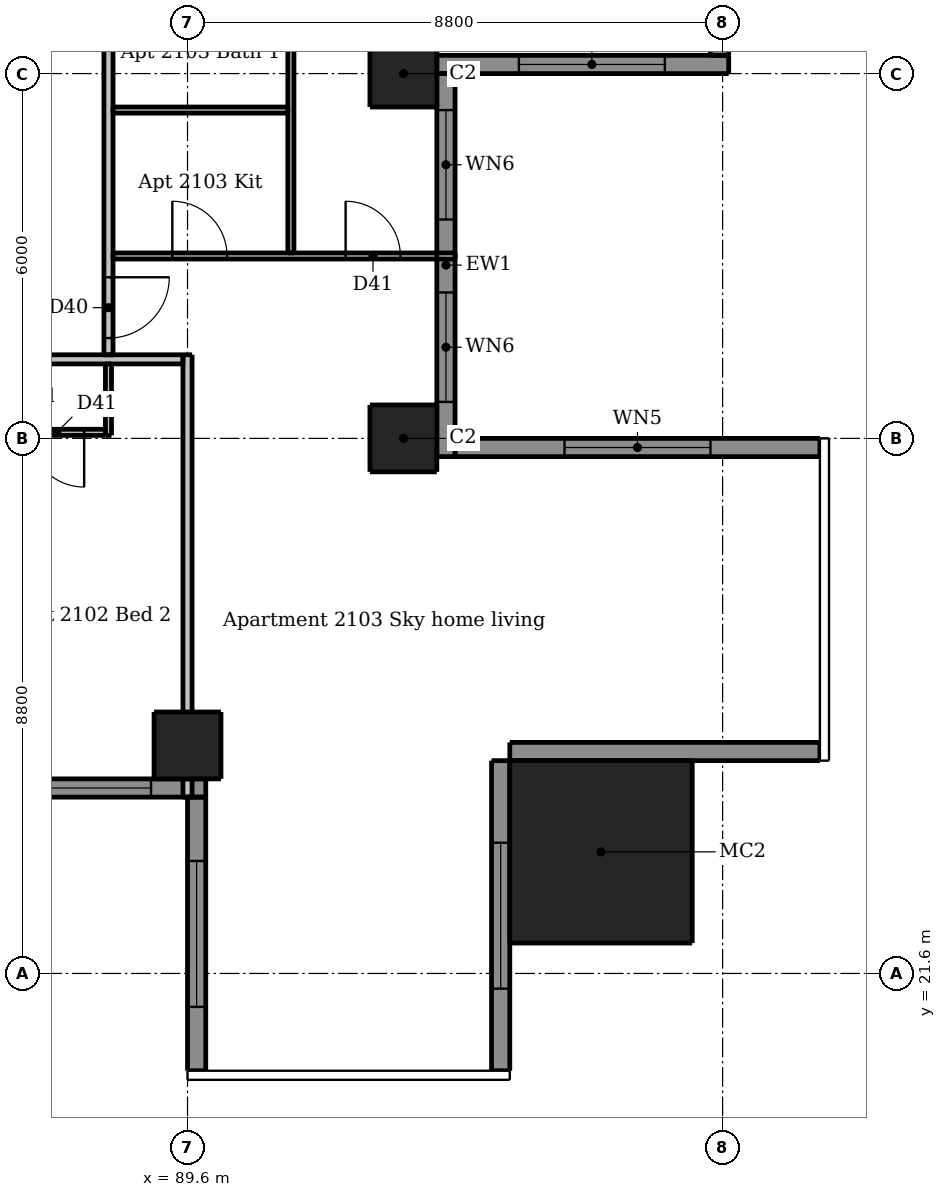
"""IFC4 building model, lengths in metres.
Left out: names, types, materials, properties, quantities, classifications, styles, units other than length and angle.
Written with IfcOpenShell. Run it as: python <this file> out.ifc"""

import sys

from ifc_helpers import new_model, si_unit, direction, frame, frame_2d, origin, origin_2d, place, context, subcontext, project, spatial, rectangle, extrude, element, fill, save


model = new_model("IFC4")
c1 = context("Model", 3, precision=1e-05, world=origin(), true_north=direction((0.0, 1.0)))
c2 = subcontext(c1, "Body", "Model", "MODEL_VIEW")
j1 = project(units=[si_unit("LENGTHUNIT", "METRE"), si_unit("PLANEANGLEUNIT", "RADIAN")], contexts=[c1])
p1 = place(None, origin())
s1 = spatial("IfcSite", under=j1, at=p1, CompositionType="ELEMENT")
p2 = place(p1, origin())
s2 = spatial("IfcBuilding", under=s1, at=p2, CompositionType="ELEMENT")
p3 = place(p2, frame((0.0, 0.0, 82.0)))
s3 = spatial("IfcBuildingStorey", under=s2, at=p3, CompositionType="ELEMENT", Elevation=82.0)
for number, where, z_axis, x_axis in (
    (1, (89.6, 25.35, 0.0), (0.0, 0.0, 1.0), (1.0, 0.0, 0.0)),
    (2, (93.15, 30.4, 0.0), (0.0, 0.0, 1.0), (1.0, 0.0, 0.0)),
    (3, (93.15, 36.4, 0.0), (0.0, 0.0, 1.0), (1.0, 0.0, 0.0)),
):
    element("IfcColumn", number, at=place(p3, frame(where, z_axis=z_axis, x_axis=x_axis)), inside=s3, PredefinedType="COLUMN", context=c2, shape_type="SweptSolid", body=[
        extrude(rectangle(XDim=1.1, YDim=1.1, at=origin_2d()), origin(), (0.0, 0.0, 1.0), 3.05),
    ])
p4 = place(p3, frame((96.4, 23.6, 0.0), z_axis=(0.0, 0.0, 1.0), x_axis=(1.0, 0.0, 0.0)))
e4 = element("IfcColumn", 4, at=p4, inside=s3, PredefinedType="COLUMN", context=c2, shape_type="SweptSolid", body=[
    extrude(rectangle(XDim=3.0, YDim=3.0, at=origin_2d()), origin(), (0.0, 0.0, 1.0), 3.3),
])
p5 = place(p3, frame((89.75, 24.5, 0.0), z_axis=(0.0, 0.0, 1.0), x_axis=(0.0, -1.0, 0.0)))
e5 = element("IfcWall", 5, at=p5, inside=s3, PredefinedType="SOLIDWALL", context=c2, shape_type="SweptSolid", body=[
    extrude(rectangle(XDim=4.5, YDim=0.3, at=frame_2d((2.25, 0.0))), origin(), (0.0, 0.0, 1.0), 3.05),
])
p6 = place(p5, frame((1.05, 0.0, 0.15)))
e6 = element("IfcOpeningElement", 6, at=p6, cuts=e5, PredefinedType="OPENING", context=c2, shape_type="SweptSolid", body=[
    extrude(rectangle(XDim=2.4, YDim=2.1, at=frame_2d((1.2, 1.05))), frame((0.0, 0.16, 0.0), z_axis=(0.0, -1.0, 0.0), x_axis=(1.0, 0.0, 0.0)), (0.0, 0.0, 1.0), 0.32),
])
p7 = place(p3, frame((94.75, 20.0, 0.0), z_axis=(0.0, 0.0, 1.0), x_axis=(0.0, 1.0, 0.0)))
e7 = element("IfcWall", 7, at=p7, inside=s3, PredefinedType="SOLIDWALL", context=c2, shape_type="SweptSolid", body=[
    extrude(rectangle(XDim=5.1, YDim=0.3, at=frame_2d((2.55, 0.0))), origin(), (0.0, 0.0, 1.0), 3.05),
])
p8 = place(p7, frame((1.35, 0.0, 0.15)))
e8 = element("IfcOpeningElement", 8, at=p8, cuts=e7, PredefinedType="OPENING", context=c2, shape_type="SweptSolid", body=[
    extrude(rectangle(XDim=2.4, YDim=2.1, at=frame_2d((1.2, 1.05))), frame((0.0, 0.16, 0.0), z_axis=(0.0, -1.0, 0.0), x_axis=(1.0, 0.0, 0.0)), (0.0, 0.0, 1.0), 0.32),
])
p9 = place(p3, frame((94.9, 25.25, 0.0), z_axis=(0.0, 0.0, 1.0), x_axis=(1.0, 0.0, 0.0)))
e9 = element("IfcWall", 9, at=p9, inside=s3, PredefinedType="SOLIDWALL", context=c2, shape_type="SweptSolid", body=[
    extrude(rectangle(XDim=5.1, YDim=0.3, at=frame_2d((2.55, 0.0))), origin(), (0.0, 0.0, 1.0), 3.05),
])
p10 = place(p3, frame((100.0, 30.25, 0.0), z_axis=(0.0, 0.0, 1.0), x_axis=(-1.0, 0.0, 0.0)))
e10 = element("IfcWall", 10, at=p10, inside=s3, PredefinedType="SOLIDWALL", context=c2, shape_type="SweptSolid", body=[
    extrude(rectangle(XDim=6.0, YDim=0.3, at=frame_2d((3.0, 0.0))), origin(), (0.0, 0.0, 1.0), 3.05),
])
p11 = place(p10, frame((1.8, 0.0, 0.15)))
e11 = element("IfcOpeningElement", 11, at=p11, cuts=e10, PredefinedType="OPENING", context=c2, shape_type="SweptSolid", body=[
    extrude(rectangle(XDim=2.4, YDim=2.1, at=frame_2d((1.2, 1.05))), frame((0.0, 0.16, 0.0), z_axis=(0.0, -1.0, 0.0), x_axis=(1.0, 0.0, 0.0)), (0.0, 0.0, 1.0), 0.32),
])
p12 = place(p3, frame((93.7, 36.55, 0.0), z_axis=(0.0, 0.0, 1.0), x_axis=(1.0, 0.0, 0.0)))
e12 = element("IfcWall", 12, at=p12, inside=s3, PredefinedType="SOLIDWALL", context=c2, shape_type="SweptSolid", body=[
    extrude(rectangle(XDim=4.8, YDim=0.3, at=frame_2d((2.4, 0.0))), origin(), (0.0, 0.0, 1.0), 3.05),
])
p13 = place(p12, frame((1.35, 0.0, 0.15)))
e13 = element("IfcOpeningElement", 13, at=p13, cuts=e12, PredefinedType="OPENING", context=c2, shape_type="SweptSolid", body=[
    extrude(rectangle(XDim=2.4, YDim=2.1, at=frame_2d((1.2, 1.05))), frame((0.0, 0.16, 0.0), z_axis=(0.0, -1.0, 0.0), x_axis=(1.0, 0.0, 0.0)), (0.0, 0.0, 1.0), 0.32),
])
p14 = place(p3, frame((83.6, 24.65, 0.0), z_axis=(0.0, 0.0, 1.0), x_axis=(1.0, 0.0, 0.0)))
e14 = element("IfcWall", 14, at=p14, inside=s3, PredefinedType="SOLIDWALL", context=c2, shape_type="SweptSolid", body=[
    extrude(rectangle(XDim=6.3, YDim=0.3, at=frame_2d((3.15, 0.0))), origin(), (0.0, 0.0, 1.0), 3.05),
])
p15 = place(p14, frame((0.6, 0.0, 0.15)))
e15 = element("IfcOpeningElement", 15, at=p15, cuts=e14, PredefinedType="OPENING", context=c2, shape_type="SweptSolid", body=[
    extrude(rectangle(XDim=1.8, YDim=2.1, at=frame_2d((0.9, 1.05))), frame((0.0, 0.16, 0.0), z_axis=(0.0, -1.0, 0.0), x_axis=(1.0, 0.0, 0.0)), (0.0, 0.0, 1.0), 0.32),
])
p16 = place(p14, frame((3.6, 0.0, 0.15)))
e16 = element("IfcOpeningElement", 16, at=p16, cuts=e14, PredefinedType="OPENING", context=c2, shape_type="SweptSolid", body=[
    extrude(rectangle(XDim=1.8, YDim=2.1, at=frame_2d((0.9, 1.05))), frame((0.0, 0.16, 0.0), z_axis=(0.0, -1.0, 0.0), x_axis=(1.0, 0.0, 0.0)), (0.0, 0.0, 1.0), 0.32),
])
p17 = place(p3, frame((93.85, 30.1, 0.0), z_axis=(0.0, 0.0, 1.0), x_axis=(0.0, 1.0, 0.0)))
e17 = element("IfcWall", 17, at=p17, inside=s3, PredefinedType="SOLIDWALL", context=c2, shape_type="SweptSolid", body=[
    extrude(rectangle(XDim=6.3, YDim=0.3, at=frame_2d((3.15, 0.0))), origin(), (0.0, 0.0, 1.0), 3.05),
])
p18 = place(p17, frame((0.9, 0.0, 0.15)))
e18 = element("IfcOpeningElement", 18, at=p18, cuts=e17, PredefinedType="OPENING", context=c2, shape_type="SweptSolid", body=[
    extrude(rectangle(XDim=1.8, YDim=2.1, at=frame_2d((0.9, 1.05))), frame((0.0, 0.16, 0.0), z_axis=(0.0, -1.0, 0.0), x_axis=(1.0, 0.0, 0.0)), (0.0, 0.0, 1.0), 0.32),
])
p19 = place(p17, frame((3.9, 0.0, 0.15)))
e19 = element("IfcOpeningElement", 19, at=p19, cuts=e17, PredefinedType="OPENING", context=c2, shape_type="SweptSolid", body=[
    extrude(rectangle(XDim=1.8, YDim=2.1, at=frame_2d((0.9, 1.05))), frame((0.0, 0.16, 0.0), z_axis=(0.0, -1.0, 0.0), x_axis=(1.0, 0.0, 0.0)), (0.0, 0.0, 1.0), 0.32),
])
p20 = place(p3, frame((98.35, 36.7, 0.0), z_axis=(0.0, 0.0, 1.0), x_axis=(0.0, 1.0, 0.0)))
e20 = element("IfcWall", 20, at=p20, inside=s3, PredefinedType="SOLIDWALL", context=c2, shape_type="SweptSolid", body=[
    extrude(rectangle(XDim=5.7, YDim=0.3, at=frame_2d((2.85, 0.0))), origin(), (0.0, 0.0, 1.0), 3.05),
])
p21 = place(p20, frame((0.3, 0.0, 0.15)))
e21 = element("IfcOpeningElement", 21, at=p21, cuts=e20, PredefinedType="OPENING", context=c2, shape_type="SweptSolid", body=[
    extrude(rectangle(XDim=1.8, YDim=2.1, at=frame_2d((0.9, 1.05))), frame((0.0, 0.16, 0.0), z_axis=(0.0, -1.0, 0.0), x_axis=(1.0, 0.0, 0.0)), (0.0, 0.0, 1.0), 0.32),
])
p22 = place(p20, frame((3.3, 0.0, 0.15)))
e22 = element("IfcOpeningElement", 22, at=p22, cuts=e20, PredefinedType="OPENING", context=c2, shape_type="SweptSolid", body=[
    extrude(rectangle(XDim=1.8, YDim=2.1, at=frame_2d((0.9, 1.05))), frame((0.0, 0.16, 0.0), z_axis=(0.0, -1.0, 0.0), x_axis=(1.0, 0.0, 0.0)), (0.0, 0.0, 1.0), 0.32),
])
p23 = place(p3, frame((88.3, 30.45, 0.0), z_axis=(0.0, 0.0, 1.0), x_axis=(0.0, 1.0, 0.0)))
e23 = element("IfcWall", 23, at=p23, inside=s3, PredefinedType="PARTITIONING", context=c2, shape_type="SweptSolid", body=[
    extrude(rectangle(XDim=1.175, YDim=0.1, at=frame_2d((0.587, 0.0))), origin(), (0.0, 0.0, 1.0), 3.05),
])
p24 = place(p3, frame((91.3, 33.45, 0.0), z_axis=(0.0, 0.0, 1.0), x_axis=(0.0, 1.0, 0.0)))
e24 = element("IfcWall", 24, at=p24, inside=s3, PredefinedType="PARTITIONING", context=c2, shape_type="SweptSolid", body=[
    extrude(rectangle(XDim=5.975, YDim=0.1, at=frame_2d((2.988, 0.0))), origin(), (0.0, 0.0, 1.0), 3.05),
])
p25 = place(p24, frame((3.8, 0.0, 0.0)))
e25 = element("IfcOpeningElement", 25, at=p25, cuts=e24, PredefinedType="OPENING", context=c2, shape_type="SweptSolid", body=[
    extrude(rectangle(XDim=0.8, YDim=2.1, at=frame_2d((0.4, 1.05))), frame((0.0, 0.06, 0.0), z_axis=(0.0, -1.0, 0.0), x_axis=(1.0, 0.0, 0.0)), (0.0, 0.0, 1.0), 0.12),
])
p26 = place(p3, frame((88.375, 35.8, 0.0), z_axis=(0.0, 0.0, 1.0), x_axis=(1.0, 0.0, 0.0)))
e26 = element("IfcWall", 26, at=p26, inside=s3, PredefinedType="PARTITIONING", context=c2, shape_type="SweptSolid", body=[
    extrude(rectangle(XDim=2.875, YDim=0.1, at=frame_2d((1.438, 0.0))), origin(), (0.0, 0.0, 1.0), 3.05),
])
p27 = place(p3, frame((88.375, 33.4, 0.0), z_axis=(0.0, 0.0, 1.0), x_axis=(1.0, 0.0, 0.0)))
e27 = element("IfcWall", 27, at=p27, inside=s3, PredefinedType="PARTITIONING", context=c2, shape_type="SweptSolid", body=[
    extrude(rectangle(XDim=5.625, YDim=0.1, at=frame_2d((2.812, 0.0))), origin(), (0.0, 0.0, 1.0), 3.05),
])
p28 = place(p27, frame((0.975, 0.0, 0.0)))
e28 = element("IfcOpeningElement", 28, at=p28, cuts=e27, PredefinedType="OPENING", context=c2, shape_type="SweptSolid", body=[
    extrude(rectangle(XDim=0.9, YDim=2.1, at=frame_2d((0.45, 1.05))), frame((0.0, 0.06, 0.0), z_axis=(0.0, -1.0, 0.0), x_axis=(1.0, 0.0, 0.0)), (0.0, 0.0, 1.0), 0.12),
])
p29 = place(p27, frame((3.825, 0.0, 0.0)))
e29 = element("IfcOpeningElement", 29, at=p29, cuts=e27, PredefinedType="OPENING", context=c2, shape_type="SweptSolid", body=[
    extrude(rectangle(XDim=0.9, YDim=2.1, at=frame_2d((0.45, 1.05))), frame((0.0, 0.06, 0.0), z_axis=(0.0, -1.0, 0.0), x_axis=(1.0, 0.0, 0.0)), (0.0, 0.0, 1.0), 0.12),
])
p30 = place(p3, frame((88.25, 30.5, 0.0), z_axis=(0.0, 0.0, 1.0), x_axis=(-1.0, 0.0, 0.0)))
e30 = element("IfcWall", 30, at=p30, inside=s3, PredefinedType="PARTITIONING", context=c2, shape_type="SweptSolid", body=[
    extrude(rectangle(XDim=13.475, YDim=0.1, at=frame_2d((6.738, 0.0))), origin(), (0.0, 0.0, 1.0), 3.05),
])
p31 = place(p30, frame((6.3, 0.0, 0.0)))
e31 = element("IfcOpeningElement", 31, at=p31, cuts=e30, PredefinedType="OPENING", context=c2, shape_type="SweptSolid", body=[
    extrude(rectangle(XDim=0.9, YDim=2.1, at=frame_2d((0.45, 1.05))), frame((0.0, 0.06, 0.0), z_axis=(0.0, -1.0, 0.0), x_axis=(1.0, 0.0, 0.0)), (0.0, 0.0, 1.0), 0.12),
])
p32 = place(p30, frame((2.4, 0.0, 0.0)))
e32 = element("IfcOpeningElement", 32, at=p32, cuts=e30, PredefinedType="OPENING", context=c2, shape_type="SweptSolid", body=[
    extrude(rectangle(XDim=0.9, YDim=2.1, at=frame_2d((0.45, 1.05))), frame((0.0, 0.06, 0.0), z_axis=(0.0, -1.0, 0.0), x_axis=(1.0, 0.0, 0.0)), (0.0, 0.0, 1.0), 0.12),
])
p33 = place(p30, frame((4.5, 0.0, 0.0)))
e33 = element("IfcOpeningElement", 33, at=p33, cuts=e30, PredefinedType="OPENING", context=c2, shape_type="SweptSolid", body=[
    extrude(rectangle(XDim=0.9, YDim=2.1, at=frame_2d((0.45, 1.05))), frame((0.0, 0.06, 0.0), z_axis=(0.0, -1.0, 0.0), x_axis=(1.0, 0.0, 0.0)), (0.0, 0.0, 1.0), 0.12),
])
p34 = place(p30, frame((11.35, 0.0, 0.0)))
e34 = element("IfcOpeningElement", 34, at=p34, cuts=e30, PredefinedType="OPENING", context=c2, shape_type="SweptSolid", body=[
    extrude(rectangle(XDim=0.9, YDim=2.1, at=frame_2d((0.45, 1.05))), frame((0.0, 0.06, 0.0), z_axis=(0.0, -1.0, 0.0), x_axis=(1.0, 0.0, 0.0)), (0.0, 0.0, 1.0), 0.12),
])
p35 = place(p30, frame((0.35, 0.0, 0.0)))
e35 = element("IfcOpeningElement", 35, at=p35, cuts=e30, PredefinedType="OPENING", context=c2, shape_type="SweptSolid", body=[
    extrude(rectangle(XDim=0.9, YDim=2.1, at=frame_2d((0.45, 1.05))), frame((0.0, 0.06, 0.0), z_axis=(0.0, -1.0, 0.0), x_axis=(1.0, 0.0, 0.0)), (0.0, 0.0, 1.0), 0.12),
])
p36 = place(p30, frame((8.45, 0.0, 0.0)))
e36 = element("IfcOpeningElement", 36, at=p36, cuts=e30, PredefinedType="OPENING", context=c2, shape_type="SweptSolid", body=[
    extrude(rectangle(XDim=0.8, YDim=2.1, at=frame_2d((0.4, 1.05))), frame((0.0, 0.06, 0.0), z_axis=(0.0, -1.0, 0.0), x_axis=(1.0, 0.0, 0.0)), (0.0, 0.0, 1.0), 0.12),
])
p37 = place(p3, frame((88.3, 60.475, 0.0), z_axis=(0.0, 0.0, 1.0), x_axis=(0.0, -1.0, 0.0)))
e37 = element("IfcWall", 37, at=p37, inside=s3, PredefinedType="PARTITIONING", context=c2, shape_type="SweptSolid", body=[
    extrude(rectangle(XDim=28.7, YDim=0.15, at=frame_2d((14.35, 0.0))), origin(), (0.0, 0.0, 1.0), 3.05),
])
p38 = place(p37, frame((27.425, 0.0, 0.0)))
e38 = element("IfcOpeningElement", 38, at=p38, cuts=e37, PredefinedType="OPENING", context=c2, shape_type="SweptSolid", body=[
    extrude(rectangle(XDim=1.0, YDim=2.1, at=frame_2d((0.5, 1.05))), frame((0.0, 0.085, 0.0), z_axis=(0.0, -1.0, 0.0), x_axis=(1.0, 0.0, 0.0)), (0.0, 0.0, 1.0), 0.17),
])
p39 = place(p37, frame((10.575, 0.0, 0.0)))
e39 = element("IfcOpeningElement", 39, at=p39, cuts=e37, PredefinedType="OPENING", context=c2, shape_type="SweptSolid", body=[
    extrude(rectangle(XDim=1.0, YDim=2.1, at=frame_2d((0.5, 1.05))), frame((0.0, 0.085, 0.0), z_axis=(0.0, -1.0, 0.0), x_axis=(1.0, 0.0, 0.0)), (0.0, 0.0, 1.0), 0.17),
])
p40 = place(p3, frame((89.6, 24.5, 0.0), z_axis=(0.0, 0.0, 1.0), x_axis=(0.0, 1.0, 0.0)))
e40 = element("IfcWall", 40, at=p40, inside=s3, PredefinedType="PARTITIONING", context=c2, shape_type="SweptSolid", body=[
    extrude(rectangle(XDim=7.275, YDim=0.15, at=frame_2d((3.637, 0.0))), origin(), (0.0, 0.0, 1.0), 2.516),
])
p41 = place(p3, frame((89.525, 31.7, 0.0), z_axis=(0.0, 0.0, 1.0), x_axis=(-1.0, 0.0, 0.0)))
e41 = element("IfcWall", 41, at=p41, inside=s3, PredefinedType="PARTITIONING", context=c2, shape_type="SweptSolid", body=[
    extrude(rectangle(XDim=28.75, YDim=0.15, at=frame_2d((14.375, 0.0))), origin(), (0.0, 0.0, 1.0), 3.05),
])
p42 = place(p41, frame((24.625, 0.0, 0.0)))
e42 = element("IfcOpeningElement", 42, at=p42, cuts=e41, PredefinedType="OPENING", context=c2, shape_type="SweptSolid", body=[
    extrude(rectangle(XDim=1.0, YDim=2.1, at=frame_2d((0.5, 1.05))), frame((0.0, 0.085, 0.0), z_axis=(0.0, -1.0, 0.0), x_axis=(1.0, 0.0, 0.0)), (0.0, 0.0, 1.0), 0.17),
])
p43 = place(p41, frame((7.525, 0.0, 0.0)))
e43 = element("IfcOpeningElement", 43, at=p43, cuts=e41, PredefinedType="OPENING", context=c2, shape_type="SweptSolid", body=[
    extrude(rectangle(XDim=1.0, YDim=2.1, at=frame_2d((0.5, 1.05))), frame((0.0, 0.085, 0.0), z_axis=(0.0, -1.0, 0.0), x_axis=(1.0, 0.0, 0.0)), (0.0, 0.0, 1.0), 0.17),
])
p44 = place(p6, origin())
e44 = element("IfcWindow", 44, at=p44, inside=s3, PartitioningType="DOUBLE_PANEL_VERTICAL", PredefinedType="WINDOW", context=c2, shape_type="SweptSolid", body=[
    extrude(rectangle(XDim=2.4, YDim=2.1, at=frame_2d((1.2, 1.05))), frame((0.0, 0.03, 0.0), z_axis=(0.0, -1.0, 0.0), x_axis=(1.0, 0.0, 0.0)), (0.0, 0.0, 1.0), 0.06),
])
fill(e6, e44)
p45 = place(p8, origin())
e45 = element("IfcWindow", 45, at=p45, inside=s3, PartitioningType="DOUBLE_PANEL_VERTICAL", PredefinedType="WINDOW", context=c2, shape_type="SweptSolid", body=[
    extrude(rectangle(XDim=2.4, YDim=2.1, at=frame_2d((1.2, 1.05))), frame((0.0, 0.03, 0.0), z_axis=(0.0, -1.0, 0.0), x_axis=(1.0, 0.0, 0.0)), (0.0, 0.0, 1.0), 0.06),
])
fill(e8, e45)
p46 = place(p11, origin())
e46 = element("IfcWindow", 46, at=p46, inside=s3, PartitioningType="DOUBLE_PANEL_VERTICAL", PredefinedType="WINDOW", context=c2, shape_type="SweptSolid", body=[
    extrude(rectangle(XDim=2.4, YDim=2.1, at=frame_2d((1.2, 1.05))), frame((0.0, 0.03, 0.0), z_axis=(0.0, -1.0, 0.0), x_axis=(1.0, 0.0, 0.0)), (0.0, 0.0, 1.0), 0.06),
])
fill(e11, e46)
p47 = place(p13, origin())
e47 = element("IfcWindow", 47, at=p47, inside=s3, PartitioningType="DOUBLE_PANEL_VERTICAL", PredefinedType="WINDOW", context=c2, shape_type="SweptSolid", body=[
    extrude(rectangle(XDim=2.4, YDim=2.1, at=frame_2d((1.2, 1.05))), frame((0.0, 0.03, 0.0), z_axis=(0.0, -1.0, 0.0), x_axis=(1.0, 0.0, 0.0)), (0.0, 0.0, 1.0), 0.06),
])
fill(e13, e47)
p48 = place(p16, origin())
e48 = element("IfcWindow", 48, at=p48, inside=s3, PartitioningType="DOUBLE_PANEL_VERTICAL", PredefinedType="WINDOW", context=c2, shape_type="SweptSolid", body=[
    extrude(rectangle(XDim=1.8, YDim=2.1, at=frame_2d((0.9, 1.05))), frame((0.0, 0.03, 0.0), z_axis=(0.0, -1.0, 0.0), x_axis=(1.0, 0.0, 0.0)), (0.0, 0.0, 1.0), 0.06),
])
fill(e16, e48)
p49 = place(p18, origin())
e49 = element("IfcWindow", 49, at=p49, inside=s3, PartitioningType="DOUBLE_PANEL_VERTICAL", PredefinedType="WINDOW", context=c2, shape_type="SweptSolid", body=[
    extrude(rectangle(XDim=1.8, YDim=2.1, at=frame_2d((0.9, 1.05))), frame((0.0, 0.03, 0.0), z_axis=(0.0, -1.0, 0.0), x_axis=(1.0, 0.0, 0.0)), (0.0, 0.0, 1.0), 0.06),
])
fill(e18, e49)
p50 = place(p19, origin())
e50 = element("IfcWindow", 50, at=p50, inside=s3, PartitioningType="DOUBLE_PANEL_VERTICAL", PredefinedType="WINDOW", context=c2, shape_type="SweptSolid", body=[
    extrude(rectangle(XDim=1.8, YDim=2.1, at=frame_2d((0.9, 1.05))), frame((0.0, 0.03, 0.0), z_axis=(0.0, -1.0, 0.0), x_axis=(1.0, 0.0, 0.0)), (0.0, 0.0, 1.0), 0.06),
])
fill(e19, e50)
p51 = place(p35, origin())
e51 = element("IfcDoor", 51, at=p51, inside=s3, OperationType="SINGLE_SWING_LEFT", PredefinedType="DOOR", context=c2, shape_type="SweptSolid", body=[
    extrude(rectangle(XDim=0.9, YDim=2.1, at=frame_2d((0.45, 1.05))), frame((0.0, 0.025, 0.0), z_axis=(0.0, -1.0, 0.0), x_axis=(1.0, 0.0, 0.0)), (0.0, 0.0, 1.0), 0.05),
])
fill(e35, e51)
p52 = place(p38, origin())
e52 = element("IfcDoor", 52, at=p52, inside=s3, OperationType="SINGLE_SWING_LEFT", PredefinedType="DOOR", context=c2, shape_type="SweptSolid", body=[
    extrude(rectangle(XDim=1.0, YDim=2.1, at=frame_2d((0.5, 1.05))), frame((0.0, 0.025, 0.0), z_axis=(0.0, -1.0, 0.0), x_axis=(1.0, 0.0, 0.0)), (0.0, 0.0, 1.0), 0.05),
])
fill(e38, e52)
p53 = place(p28, origin())
e53 = element("IfcDoor", 53, at=p53, inside=s3, OperationType="SINGLE_SWING_LEFT", PredefinedType="DOOR", context=c2, shape_type="SweptSolid", body=[
    extrude(rectangle(XDim=0.9, YDim=2.1, at=frame_2d((0.45, 1.05))), frame((0.0, 0.025, 0.0), z_axis=(0.0, -1.0, 0.0), x_axis=(1.0, 0.0, 0.0)), (0.0, 0.0, 1.0), 0.05),
])
fill(e28, e53)
p54 = place(p29, origin())
e54 = element("IfcDoor", 54, at=p54, inside=s3, OperationType="SINGLE_SWING_LEFT", PredefinedType="DOOR", context=c2, shape_type="SweptSolid", body=[
    extrude(rectangle(XDim=0.9, YDim=2.1, at=frame_2d((0.45, 1.05))), frame((0.0, 0.025, 0.0), z_axis=(0.0, -1.0, 0.0), x_axis=(1.0, 0.0, 0.0)), (0.0, 0.0, 1.0), 0.05),
])
fill(e29, e54)
save(model, sys.argv[1])
